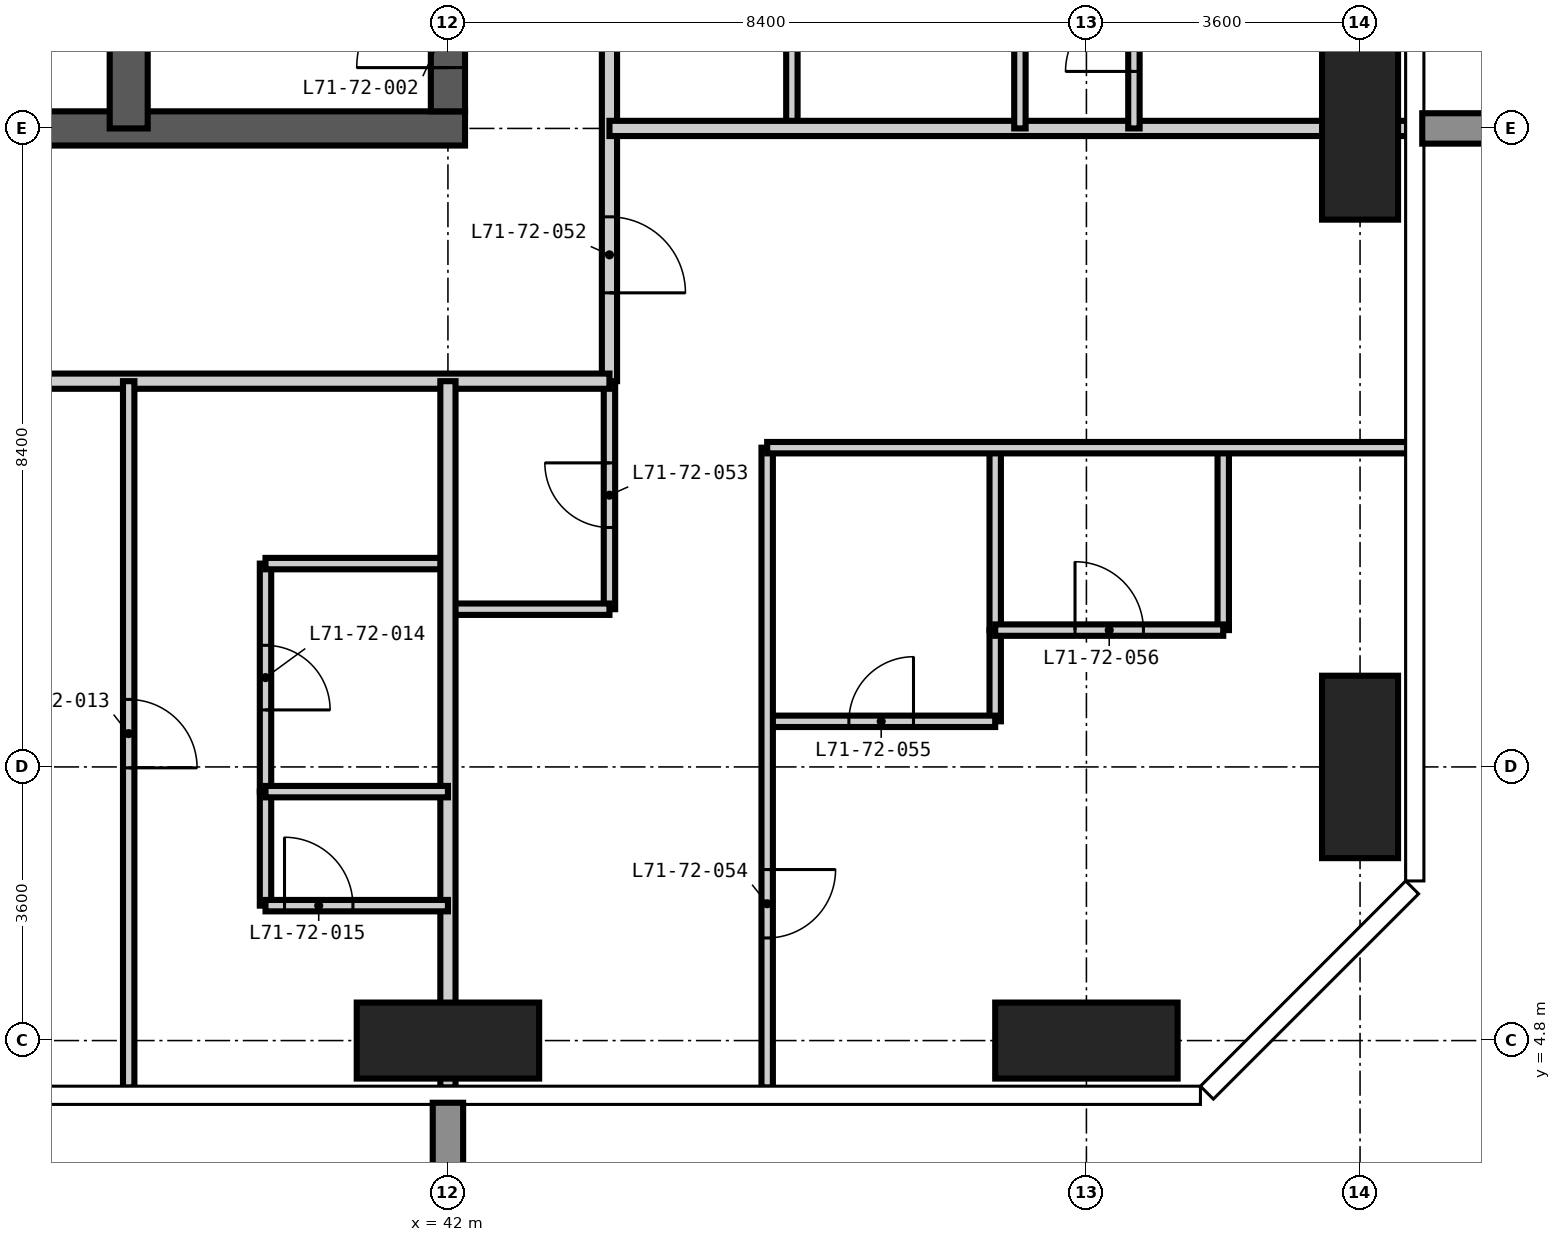
"""IFC4 building model, lengths in metres.
Left out: names, types, materials, properties, quantities, classifications, styles, units other than length and angle.
Written with IfcOpenShell. Run it as: python <this file> out.ifc"""

import sys

from ifc_helpers import new_model, si_unit, direction, frame, frame_2d, origin, origin_2d, place, context, subcontext, project, spatial, rectangle, extrude, element, fill, save


model = new_model("IFC4")
c1 = context("Model", 3, precision=1e-05, world=origin(), true_north=direction((0.0, 1.0)))
c2 = subcontext(c1, "Body", "Model", "MODEL_VIEW")
j1 = project(units=[si_unit("LENGTHUNIT", "METRE"), si_unit("PLANEANGLEUNIT", "RADIAN")], contexts=[c1])
p1 = place(None, origin())
s1 = spatial("IfcSite", under=j1, at=p1, CompositionType="ELEMENT")
p2 = place(p1, origin())
s2 = spatial("IfcBuilding", under=s1, at=p2, CompositionType="ELEMENT")
p3 = place(p2, frame((0.0, 0.0, 276.3)))
s3 = spatial("IfcBuildingStorey", under=s2, at=p3, CompositionType="ELEMENT", Elevation=276.3)
for number, where, z_axis, x_axis in (
    (1, (42.0, 4.8, -0.35), (0.0, 0.0, 1.0), (1.0, 0.0, 0.0)),
    (2, (50.4, 4.8, -0.35), (0.0, 0.0, 1.0), (1.0, 0.0, 0.0)),
):
    element("IfcColumn", number, at=place(p3, frame(where, z_axis=z_axis, x_axis=x_axis)), inside=s3, PredefinedType="COLUMN", context=c2, shape_type="SweptSolid", body=[
        extrude(rectangle(XDim=2.4, YDim=1.0, at=origin_2d()), origin(), (0.0, 0.0, 1.0), 3.9),
    ])
for number, where, z_axis, x_axis in (
    (3, (54.0, 8.4, -0.35), (0.0, 0.0, 1.0), (1.0, 0.0, 0.0)),
    (4, (54.0, 16.8, -0.35), (0.0, 0.0, 1.0), (1.0, 0.0, 0.0)),
):
    element("IfcColumn", number, at=place(p3, frame(where, z_axis=z_axis, x_axis=x_axis)), inside=s3, PredefinedType="COLUMN", context=c2, shape_type="SweptSolid", body=[
        extrude(rectangle(XDim=1.0, YDim=2.4, at=origin_2d()), origin(), (0.0, 0.0, 1.0), 3.9),
    ])
p4 = place(p3, frame((24.975, 16.8, -0.35), z_axis=(0.0, 0.0, 1.0), x_axis=(1.0, 0.0, 0.0)))
e5 = element("IfcWall", 5, at=p4, inside=s3, PredefinedType="SHEAR", context=c2, shape_type="SweptSolid", body=[
    extrude(rectangle(XDim=17.25, YDim=0.45, at=frame_2d((8.625, 0.0))), origin(), (0.0, 0.0, 1.0), 3.9),
])
p5 = place(p4, frame((3.925, 0.0, 0.35)))
e6 = element("IfcOpeningElement", 6, at=p5, cuts=e5, PredefinedType="OPENING", context=c2, shape_type="SweptSolid", body=[
    extrude(rectangle(XDim=1.0, YDim=2.1, at=frame_2d((0.5, 1.05))), frame((0.0, 0.235, 0.0), z_axis=(0.0, -1.0, 0.0), x_axis=(1.0, 0.0, 0.0)), (0.0, 0.0, 1.0), 0.47),
])
p6 = place(p4, frame((10.225, 0.0, 0.35)))
e7 = element("IfcOpeningElement", 7, at=p6, cuts=e5, PredefinedType="OPENING", context=c2, shape_type="SweptSolid", body=[
    extrude(rectangle(XDim=1.0, YDim=2.1, at=frame_2d((0.5, 1.05))), frame((0.0, 0.235, 0.0), z_axis=(0.0, -1.0, 0.0), x_axis=(1.0, 0.0, 0.0)), (0.0, 0.0, 1.0), 0.47),
])
p7 = place(p3, frame((42.0, 17.025, -0.35), z_axis=(0.0, 0.0, 1.0), x_axis=(0.0, 1.0, 0.0)))
e8 = element("IfcWall", 8, at=p7, inside=s3, PredefinedType="SHEAR", context=c2, shape_type="SweptSolid", body=[
    extrude(rectangle(XDim=24.75, YDim=0.45, at=frame_2d((12.375, 0.0))), origin(), (0.0, 0.0, 1.0), 3.9),
])
p8 = place(p7, frame((0.575, 0.0, 0.35)))
e9 = element("IfcOpeningElement", 9, at=p8, cuts=e8, PredefinedType="OPENING", context=c2, shape_type="SweptSolid", body=[
    extrude(rectangle(XDim=1.2, YDim=2.2, at=frame_2d((0.6, 1.1))), frame((0.0, 0.235, 0.0), z_axis=(0.0, -1.0, 0.0), x_axis=(1.0, 0.0, 0.0)), (0.0, 0.0, 1.0), 0.47),
])
p9 = place(p7, frame((11.475, 0.0, 0.35)))
e10 = element("IfcOpeningElement", 10, at=p9, cuts=e8, PredefinedType="OPENING", context=c2, shape_type="SweptSolid", body=[
    extrude(rectangle(XDim=1.8, YDim=2.2, at=frame_2d((0.9, 1.1))), frame((0.0, 0.235, 0.0), z_axis=(0.0, -1.0, 0.0), x_axis=(1.0, 0.0, 0.0)), (0.0, 0.0, 1.0), 0.47),
])
p10 = place(p7, frame((20.275, 0.0, 0.35)))
e11 = element("IfcOpeningElement", 11, at=p10, cuts=e8, PredefinedType="OPENING", context=c2, shape_type="SweptSolid", body=[
    extrude(rectangle(XDim=1.0, YDim=2.1, at=frame_2d((0.5, 1.05))), frame((0.0, 0.235, 0.0), z_axis=(0.0, -1.0, 0.0), x_axis=(1.0, 0.0, 0.0)), (0.0, 0.0, 1.0), 0.47),
])
p11 = place(p3, frame((37.8, 16.8, -0.35), z_axis=(0.0, 0.0, 1.0), x_axis=(0.0, 1.0, 0.0)))
e12 = element("IfcWall", 12, at=p11, inside=s3, PredefinedType="SHEAR", context=c2, shape_type="SweptSolid", body=[
    extrude(rectangle(XDim=11.2, YDim=0.5, at=frame_2d((5.6, 0.0))), origin(), (0.0, 0.0, 1.0), 3.9),
])
p12 = place(p3, frame((39.6, 8.075, 0.0), z_axis=(0.0, 0.0, 1.0), x_axis=(0.0, 1.0, 0.0)))
e13 = element("IfcWall", 13, at=p12, inside=s3, PredefinedType="PARTITIONING", context=c2, shape_type="SweptSolid", body=[
    extrude(rectangle(XDim=3.0, YDim=0.15, at=frame_2d((1.5, 0.0))), origin(), (0.0, 0.0, 1.0), 3.55),
])
p13 = place(p12, frame((1.075, 0.0, 0.0)))
e14 = element("IfcOpeningElement", 14, at=p13, cuts=e13, PredefinedType="OPENING", context=c2, shape_type="SweptSolid", body=[
    extrude(rectangle(XDim=0.85, YDim=2.1, at=frame_2d((0.425, 1.05))), frame((0.0, 0.085, 0.0), z_axis=(0.0, -1.0, 0.0), x_axis=(1.0, 0.0, 0.0)), (0.0, 0.0, 1.0), 0.17),
])
p14 = place(p3, frame((44.125, 10.475, 0.0), z_axis=(0.0, 0.0, 1.0), x_axis=(0.0, 1.0, 0.0)))
e15 = element("IfcWall", 15, at=p14, inside=s3, PredefinedType="PARTITIONING", context=c2, shape_type="SweptSolid", body=[
    extrude(rectangle(XDim=3.0, YDim=0.15, at=frame_2d((1.5, 0.0))), origin(), (0.0, 0.0, 1.0), 3.55),
])
p15 = place(p14, frame((1.075, 0.0, 0.0)))
e16 = element("IfcOpeningElement", 16, at=p15, cuts=e15, PredefinedType="OPENING", context=c2, shape_type="SweptSolid", body=[
    extrude(rectangle(XDim=0.85, YDim=2.1, at=frame_2d((0.425, 1.05))), frame((0.0, 0.085, 0.0), z_axis=(0.0, -1.0, 0.0), x_axis=(1.0, 0.0, 0.0)), (0.0, 0.0, 1.0), 0.17),
])
p16 = place(p3, frame((46.525, 16.8, 0.0), z_axis=(0.0, 0.0, 1.0), x_axis=(0.0, 1.0, 0.0)))
e17 = element("IfcWall", 17, at=p16, inside=s3, PredefinedType="PARTITIONING", context=c2, shape_type="SweptSolid", body=[
    extrude(rectangle(XDim=2.4, YDim=0.15, at=frame_2d((1.2, 0.0))), origin(), (0.0, 0.0, 1.0), 3.55),
])
p17 = place(p3, frame((49.2, 9.0, 0.0), z_axis=(0.0, 0.0, 1.0), x_axis=(0.0, 1.0, 0.0)))
e18 = element("IfcWall", 18, at=p17, inside=s3, PredefinedType="PARTITIONING", context=c2, shape_type="SweptSolid", body=[
    extrude(rectangle(XDim=1.2, YDim=0.15, at=frame_2d((0.6, 0.0))), origin(), (0.0, 0.0, 1.0), 3.55),
])
p18 = place(p3, frame((46.2, 9.0, 0.0), z_axis=(0.0, 0.0, 1.0), x_axis=(1.0, 0.0, 0.0)))
e19 = element("IfcWall", 19, at=p18, inside=s3, PredefinedType="PARTITIONING", context=c2, shape_type="SweptSolid", body=[
    extrude(rectangle(XDim=3.0, YDim=0.15, at=frame_2d((1.5, 0.0))), origin(), (0.0, 0.0, 1.0), 3.55),
])
p19 = place(p18, frame((1.075, 0.0, 0.0)))
e20 = element("IfcOpeningElement", 20, at=p19, cuts=e19, PredefinedType="OPENING", context=c2, shape_type="SweptSolid", body=[
    extrude(rectangle(XDim=0.85, YDim=2.1, at=frame_2d((0.425, 1.05))), frame((0.0, 0.085, 0.0), z_axis=(0.0, -1.0, 0.0), x_axis=(1.0, 0.0, 0.0)), (0.0, 0.0, 1.0), 0.17),
])
p20 = place(p3, frame((42.0, 10.475, 0.0), z_axis=(0.0, 0.0, 1.0), x_axis=(1.0, 0.0, 0.0)))
e21 = element("IfcWall", 21, at=p20, inside=s3, PredefinedType="PARTITIONING", context=c2, shape_type="SweptSolid", body=[
    extrude(rectangle(XDim=2.125, YDim=0.15, at=frame_2d((1.062, 0.0))), origin(), (0.0, 0.0, 1.0), 3.55),
])
p21 = place(p3, frame((39.6, 11.075, 0.0), z_axis=(0.0, 0.0, 1.0), x_axis=(1.0, 0.0, 0.0)))
e22 = element("IfcWall", 22, at=p21, inside=s3, PredefinedType="PARTITIONING", context=c2, shape_type="SweptSolid", body=[
    extrude(rectangle(XDim=2.4, YDim=0.15, at=frame_2d((1.2, 0.0))), origin(), (0.0, 0.0, 1.0), 3.55),
])
p22 = place(p3, frame((44.125, 25.2, 0.0), z_axis=(0.0, 0.0, 1.0), x_axis=(0.0, -1.0, 0.0)))
e23 = element("IfcWall", 23, at=p22, inside=s3, PredefinedType="PARTITIONING", context=c2, shape_type="SweptSolid", body=[
    extrude(rectangle(XDim=11.725, YDim=0.2, at=frame_2d((5.862, 0.0))), origin(), (0.0, 0.0, 1.0), 3.55),
])
p23 = place(p22, frame((3.7, 0.0, 0.0)))
e24 = element("IfcOpeningElement", 24, at=p23, cuts=e23, PredefinedType="OPENING", context=c2, shape_type="SweptSolid", body=[
    extrude(rectangle(XDim=1.0, YDim=2.2, at=frame_2d((0.5, 1.1))), frame((0.0, 0.11, 0.0), z_axis=(0.0, -1.0, 0.0), x_axis=(1.0, 0.0, 0.0)), (0.0, 0.0, 1.0), 0.22),
])
p24 = place(p22, frame((9.563, 0.0, 0.0)))
e25 = element("IfcOpeningElement", 25, at=p24, cuts=e23, PredefinedType="OPENING", context=c2, shape_type="SweptSolid", body=[
    extrude(rectangle(XDim=1.0, YDim=2.2, at=frame_2d((0.5, 1.1))), frame((0.0, 0.11, 0.0), z_axis=(0.0, -1.0, 0.0), x_axis=(1.0, 0.0, 0.0)), (0.0, 0.0, 1.0), 0.22),
])
p25 = place(p3, frame((44.125, 13.475, 0.0), z_axis=(0.0, 0.0, 1.0), x_axis=(-1.0, 0.0, 0.0)))
e26 = element("IfcWall", 26, at=p25, inside=s3, PredefinedType="PARTITIONING", context=c2, shape_type="SweptSolid", body=[
    extrude(rectangle(XDim=22.25, YDim=0.2, at=frame_2d((11.125, 0.0))), origin(), (0.0, 0.0, 1.0), 3.55),
])
p26 = place(p25, frame((11.225, 0.0, 0.0)))
e27 = element("IfcOpeningElement", 27, at=p26, cuts=e26, PredefinedType="OPENING", context=c2, shape_type="SweptSolid", body=[
    extrude(rectangle(XDim=1.0, YDim=2.2, at=frame_2d((0.5, 1.1))), frame((0.0, 0.11, 0.0), z_axis=(0.0, -1.0, 0.0), x_axis=(1.0, 0.0, 0.0)), (0.0, 0.0, 1.0), 0.22),
])
p27 = place(p3, frame((42.0, 4.182, 0.0), z_axis=(0.0, 0.0, 1.0), x_axis=(0.0, 1.0, 0.0)))
e28 = element("IfcWall", 28, at=p27, inside=s3, PredefinedType="PARTITIONING", context=c2, shape_type="SweptSolid", body=[
    extrude(rectangle(XDim=9.293, YDim=0.2, at=frame_2d((4.646, 0.0))), origin(), (0.0, 0.0, 1.0), 3.55),
])
p28 = place(p3, frame((44.125, 16.8, 0.0), z_axis=(0.0, 0.0, 1.0), x_axis=(1.0, 0.0, 0.0)))
e29 = element("IfcWall", 29, at=p28, inside=s3, PredefinedType="PARTITIONING", context=c2, shape_type="SweptSolid", body=[
    extrude(rectangle(XDim=10.493, YDim=0.2, at=frame_2d((5.247, 0.0))), origin(), (0.0, 0.0, 1.0), 3.55),
])
p29 = place(p3, frame((37.8, 4.182, 0.0), z_axis=(0.0, 0.0, 1.0), x_axis=(0.0, 1.0, 0.0)))
e30 = element("IfcWall", 30, at=p29, inside=s3, PredefinedType="PARTITIONING", context=c2, shape_type="SweptSolid", body=[
    extrude(rectangle(XDim=9.293, YDim=0.15, at=frame_2d((4.646, 0.0))), origin(), (0.0, 0.0, 1.0), 3.55),
])
p30 = place(p29, frame((4.206, 0.0, 0.0)))
e31 = element("IfcOpeningElement", 31, at=p30, cuts=e30, PredefinedType="OPENING", context=c2, shape_type="SweptSolid", body=[
    extrude(rectangle(XDim=0.9, YDim=2.1, at=frame_2d((0.45, 1.05))), frame((0.0, 0.085, 0.0), z_axis=(0.0, -1.0, 0.0), x_axis=(1.0, 0.0, 0.0)), (0.0, 0.0, 1.0), 0.17),
])
p31 = place(p3, frame((39.6, 6.575, 0.0), z_axis=(0.0, 0.0, 1.0), x_axis=(0.0, 1.0, 0.0)))
e32 = element("IfcWall", 32, at=p31, inside=s3, PredefinedType="PARTITIONING", context=c2, shape_type="SweptSolid", body=[
    extrude(rectangle(XDim=1.5, YDim=0.15, at=frame_2d((0.75, 0.0))), origin(), (0.0, 0.0, 1.0), 3.55),
])
p32 = place(p3, frame((46.2, 4.182, 0.0), z_axis=(0.0, 0.0, 1.0), x_axis=(0.0, 1.0, 0.0)))
e33 = element("IfcWall", 33, at=p32, inside=s3, PredefinedType="PARTITIONING", context=c2, shape_type="SweptSolid", body=[
    extrude(rectangle(XDim=8.418, YDim=0.15, at=frame_2d((4.209, 0.0))), origin(), (0.0, 0.0, 1.0), 3.55),
])
p33 = place(p32, frame((1.968, 0.0, 0.0)))
e34 = element("IfcOpeningElement", 34, at=p33, cuts=e33, PredefinedType="OPENING", context=c2, shape_type="SweptSolid", body=[
    extrude(rectangle(XDim=0.9, YDim=2.1, at=frame_2d((0.45, 1.05))), frame((0.0, 0.085, 0.0), z_axis=(0.0, -1.0, 0.0), x_axis=(1.0, 0.0, 0.0)), (0.0, 0.0, 1.0), 0.17),
])
p34 = place(p3, frame((49.2, 10.2, 0.0), z_axis=(0.0, 0.0, 1.0), x_axis=(0.0, 1.0, 0.0)))
e35 = element("IfcWall", 35, at=p34, inside=s3, PredefinedType="PARTITIONING", context=c2, shape_type="SweptSolid", body=[
    extrude(rectangle(XDim=2.4, YDim=0.15, at=frame_2d((1.2, 0.0))), origin(), (0.0, 0.0, 1.0), 3.55),
])
p35 = place(p3, frame((49.525, 16.8, 0.0), z_axis=(0.0, 0.0, 1.0), x_axis=(0.0, 1.0, 0.0)))
e36 = element("IfcWall", 36, at=p35, inside=s3, PredefinedType="PARTITIONING", context=c2, shape_type="SweptSolid", body=[
    extrude(rectangle(XDim=2.4, YDim=0.15, at=frame_2d((1.2, 0.0))), origin(), (0.0, 0.0, 1.0), 3.55),
])
p36 = place(p3, frame((51.025, 16.8, 0.0), z_axis=(0.0, 0.0, 1.0), x_axis=(0.0, 1.0, 0.0)))
e37 = element("IfcWall", 37, at=p36, inside=s3, PredefinedType="PARTITIONING", context=c2, shape_type="SweptSolid", body=[
    extrude(rectangle(XDim=2.4, YDim=0.15, at=frame_2d((1.2, 0.0))), origin(), (0.0, 0.0, 1.0), 3.55),
])
p37 = place(p36, frame((0.75, 0.0, 0.0)))
e38 = element("IfcOpeningElement", 38, at=p37, cuts=e37, PredefinedType="OPENING", context=c2, shape_type="SweptSolid", body=[
    extrude(rectangle(XDim=0.9, YDim=2.1, at=frame_2d((0.45, 1.05))), frame((0.0, 0.085, 0.0), z_axis=(0.0, -1.0, 0.0), x_axis=(1.0, 0.0, 0.0)), (0.0, 0.0, 1.0), 0.17),
])
p38 = place(p3, frame((52.2, 10.2, 0.0), z_axis=(0.0, 0.0, 1.0), x_axis=(0.0, 1.0, 0.0)))
e39 = element("IfcWall", 39, at=p38, inside=s3, PredefinedType="PARTITIONING", context=c2, shape_type="SweptSolid", body=[
    extrude(rectangle(XDim=2.4, YDim=0.15, at=frame_2d((1.2, 0.0))), origin(), (0.0, 0.0, 1.0), 3.55),
])
p39 = place(p3, frame((39.6, 6.575, 0.0), z_axis=(0.0, 0.0, 1.0), x_axis=(1.0, 0.0, 0.0)))
e40 = element("IfcWall", 40, at=p39, inside=s3, PredefinedType="PARTITIONING", context=c2, shape_type="SweptSolid", body=[
    extrude(rectangle(XDim=2.4, YDim=0.15, at=frame_2d((1.2, 0.0))), origin(), (0.0, 0.0, 1.0), 3.55),
])
p40 = place(p39, frame((0.25, 0.0, 0.0)))
e41 = element("IfcOpeningElement", 41, at=p40, cuts=e40, PredefinedType="OPENING", context=c2, shape_type="SweptSolid", body=[
    extrude(rectangle(XDim=0.9, YDim=2.1, at=frame_2d((0.45, 1.05))), frame((0.0, 0.085, 0.0), z_axis=(0.0, -1.0, 0.0), x_axis=(1.0, 0.0, 0.0)), (0.0, 0.0, 1.0), 0.17),
])
p41 = place(p3, frame((39.6, 8.075, 0.0), z_axis=(0.0, 0.0, 1.0), x_axis=(1.0, 0.0, 0.0)))
e42 = element("IfcWall", 42, at=p41, inside=s3, PredefinedType="PARTITIONING", context=c2, shape_type="SweptSolid", body=[
    extrude(rectangle(XDim=2.4, YDim=0.15, at=frame_2d((1.2, 0.0))), origin(), (0.0, 0.0, 1.0), 3.55),
])
p42 = place(p3, frame((49.2, 10.2, 0.0), z_axis=(0.0, 0.0, 1.0), x_axis=(1.0, 0.0, 0.0)))
e43 = element("IfcWall", 43, at=p42, inside=s3, PredefinedType="PARTITIONING", context=c2, shape_type="SweptSolid", body=[
    extrude(rectangle(XDim=3.0, YDim=0.15, at=frame_2d((1.5, 0.0))), origin(), (0.0, 0.0, 1.0), 3.55),
])
p43 = place(p42, frame((1.05, 0.0, 0.0)))
e44 = element("IfcOpeningElement", 44, at=p43, cuts=e43, PredefinedType="OPENING", context=c2, shape_type="SweptSolid", body=[
    extrude(rectangle(XDim=0.9, YDim=2.1, at=frame_2d((0.45, 1.05))), frame((0.0, 0.085, 0.0), z_axis=(0.0, -1.0, 0.0), x_axis=(1.0, 0.0, 0.0)), (0.0, 0.0, 1.0), 0.17),
])
p44 = place(p3, frame((46.2, 12.6, 0.0), z_axis=(0.0, 0.0, 1.0), x_axis=(1.0, 0.0, 0.0)))
e45 = element("IfcWall", 45, at=p44, inside=s3, PredefinedType="PARTITIONING", context=c2, shape_type="SweptSolid", body=[
    extrude(rectangle(XDim=8.418, YDim=0.15, at=frame_2d((4.209, 0.0))), origin(), (0.0, 0.0, 1.0), 3.55),
])
p45 = place(p8, origin())
e46 = element("IfcDoor", 46, at=p45, inside=s3, OperationType="SINGLE_SWING_LEFT", PredefinedType="DOOR", context=c2, shape_type="SweptSolid", body=[
    extrude(rectangle(XDim=1.2, YDim=2.2, at=frame_2d((0.6, 1.1))), frame((0.0, 0.025, 0.0), z_axis=(0.0, -1.0, 0.0), x_axis=(1.0, 0.0, 0.0)), (0.0, 0.0, 1.0), 0.05),
])
fill(e9, e46)
p46 = place(p30, frame((0.9, 0.0, 0.0), z_axis=(0.0, 0.0, 1.0), x_axis=(-1.0, 0.0, 0.0)))
e47 = element("IfcDoor", 47, at=p46, inside=s3, OperationType="SINGLE_SWING_RIGHT", PredefinedType="DOOR", context=c2, shape_type="SweptSolid", body=[
    extrude(rectangle(XDim=0.9, YDim=2.1, at=frame_2d((0.45, 1.05))), frame((0.0, 0.025, 0.0), z_axis=(0.0, -1.0, 0.0), x_axis=(1.0, 0.0, 0.0)), (0.0, 0.0, 1.0), 0.05),
])
fill(e31, e47)
p47 = place(p13, frame((0.85, 0.0, 0.0), z_axis=(0.0, 0.0, 1.0), x_axis=(-1.0, 0.0, 0.0)))
e48 = element("IfcDoor", 48, at=p47, inside=s3, OperationType="SINGLE_SWING_RIGHT", PredefinedType="DOOR", context=c2, shape_type="SweptSolid", body=[
    extrude(rectangle(XDim=0.85, YDim=2.1, at=frame_2d((0.425, 1.05))), frame((0.0, 0.025, 0.0), z_axis=(0.0, -1.0, 0.0), x_axis=(1.0, 0.0, 0.0)), (0.0, 0.0, 1.0), 0.05),
])
fill(e14, e48)
p48 = place(p40, origin())
e49 = element("IfcDoor", 49, at=p48, inside=s3, OperationType="SINGLE_SWING_LEFT", PredefinedType="DOOR", context=c2, shape_type="SweptSolid", body=[
    extrude(rectangle(XDim=0.9, YDim=2.1, at=frame_2d((0.45, 1.05))), frame((0.0, 0.025, 0.0), z_axis=(0.0, -1.0, 0.0), x_axis=(1.0, 0.0, 0.0)), (0.0, 0.0, 1.0), 0.05),
])
fill(e41, e49)
p49 = place(p37, origin())
e50 = element("IfcDoor", 50, at=p49, inside=s3, OperationType="SINGLE_SWING_LEFT", PredefinedType="DOOR", context=c2, shape_type="SweptSolid", body=[
    extrude(rectangle(XDim=0.9, YDim=2.1, at=frame_2d((0.45, 1.05))), frame((0.0, 0.025, 0.0), z_axis=(0.0, -1.0, 0.0), x_axis=(1.0, 0.0, 0.0)), (0.0, 0.0, 1.0), 0.05),
])
fill(e38, e50)
p50 = place(p24, origin())
e51 = element("IfcDoor", 51, at=p50, inside=s3, OperationType="SINGLE_SWING_RIGHT", PredefinedType="DOOR", context=c2, shape_type="SweptSolid", body=[
    extrude(rectangle(XDim=1.0, YDim=2.2, at=frame_2d((0.5, 1.1))), frame((0.0, 0.025, 0.0), z_axis=(0.0, -1.0, 0.0), x_axis=(1.0, 0.0, 0.0)), (0.0, 0.0, 1.0), 0.05),
])
fill(e25, e51)
p51 = place(p15, origin())
e52 = element("IfcDoor", 52, at=p51, inside=s3, OperationType="SINGLE_SWING_RIGHT", PredefinedType="DOOR", context=c2, shape_type="SweptSolid", body=[
    extrude(rectangle(XDim=0.85, YDim=2.1, at=frame_2d((0.425, 1.05))), frame((0.0, 0.025, 0.0), z_axis=(0.0, -1.0, 0.0), x_axis=(1.0, 0.0, 0.0)), (0.0, 0.0, 1.0), 0.05),
])
fill(e16, e52)
p52 = place(p33, frame((0.9, 0.0, 0.0), z_axis=(0.0, 0.0, 1.0), x_axis=(-1.0, 0.0, 0.0)))
e53 = element("IfcDoor", 53, at=p52, inside=s3, OperationType="SINGLE_SWING_LEFT", PredefinedType="DOOR", context=c2, shape_type="SweptSolid", body=[
    extrude(rectangle(XDim=0.9, YDim=2.1, at=frame_2d((0.45, 1.05))), frame((0.0, 0.025, 0.0), z_axis=(0.0, -1.0, 0.0), x_axis=(1.0, 0.0, 0.0)), (0.0, 0.0, 1.0), 0.05),
])
fill(e34, e53)
p53 = place(p19, origin())
e54 = element("IfcDoor", 54, at=p53, inside=s3, OperationType="SINGLE_SWING_RIGHT", PredefinedType="DOOR", context=c2, shape_type="SweptSolid", body=[
    extrude(rectangle(XDim=0.85, YDim=2.1, at=frame_2d((0.425, 1.05))), frame((0.0, 0.025, 0.0), z_axis=(0.0, -1.0, 0.0), x_axis=(1.0, 0.0, 0.0)), (0.0, 0.0, 1.0), 0.05),
])
fill(e20, e54)
p54 = place(p43, origin())
e55 = element("IfcDoor", 55, at=p54, inside=s3, OperationType="SINGLE_SWING_LEFT", PredefinedType="DOOR", context=c2, shape_type="SweptSolid", body=[
    extrude(rectangle(XDim=0.9, YDim=2.1, at=frame_2d((0.45, 1.05))), frame((0.0, 0.025, 0.0), z_axis=(0.0, -1.0, 0.0), x_axis=(1.0, 0.0, 0.0)), (0.0, 0.0, 1.0), 0.05),
])
fill(e44, e55)
save(model, sys.argv[1])
